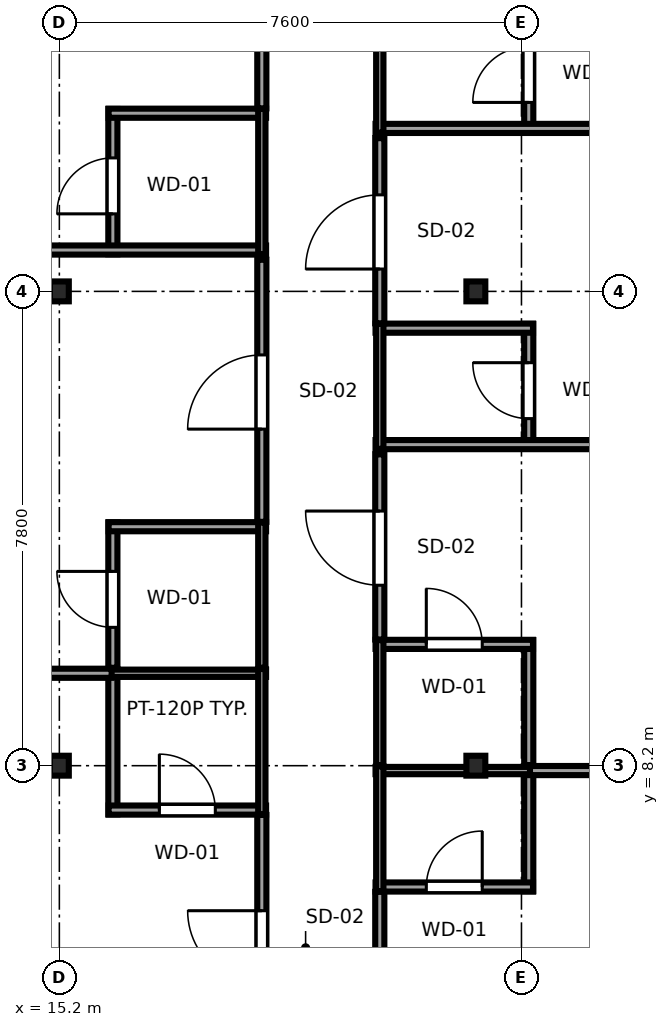
"""IFC4 building model, lengths in metres.
Left out: names, types, materials, properties, quantities, classifications, styles, units other than length and angle.
Written with IfcOpenShell. Run it as: python <this file> out.ifc"""

import sys

from ifc_helpers import new_model, si_unit, direction, frame, frame_2d, origin, origin_2d, place, context, subcontext, project, spatial, rectangle, i_section, extrude, source, transform, mapped, element, fill, save


model = new_model("IFC4")
c1 = context("Model", 3, precision=1e-05, world=origin(), true_north=direction((0.0, 1.0)))
c2 = subcontext(c1, "Body", "Model", "MODEL_VIEW")
j1 = project(units=[si_unit("LENGTHUNIT", "METRE"), si_unit("PLANEANGLEUNIT", "RADIAN")], contexts=[c1])
p1 = place(None, origin())
s1 = spatial("IfcSite", under=j1, at=p1, CompositionType="ELEMENT")
p2 = place(p1, origin())
s2 = spatial("IfcBuilding", under=s1, at=p2, CompositionType="ELEMENT")
p3 = place(p2, frame((0.0, 0.0, 231.0)))
s3 = spatial("IfcBuildingStorey", under=s2, at=p3, CompositionType="ELEMENT", Elevation=231.0)
m1 = source(origin(), c2, "Body", "SweptSolid", [
    extrude(i_section(OverallWidth=0.311, OverallDepth=0.327, WebThickness=0.016, FlangeThickness=0.025, FilletRadius=0.017, at=origin_2d()), origin(), (0.0, 0.0, 1.0), 3.55),
])
for number, where, z_axis, x_axis in (
    (1, (15.2, 8.2, 0.0), (0.0, 0.0, 1.0), (1.0, 0.0, 0.0)),
    (2, (15.2, 16.0, 0.0), (0.0, 0.0, 1.0), (1.0, 0.0, 0.0)),
    (3, (22.05, 8.2, 0.0), (0.0, 0.0, 1.0), (1.0, 0.0, 0.0)),
    (4, (22.05, 16.0, 0.0), (0.0, 0.0, 1.0), (1.0, 0.0, 0.0)),
):
    element("IfcColumn", number, at=place(p3, frame(where, z_axis=z_axis, x_axis=x_axis)), inside=s3, PredefinedType="COLUMN", context=c2, shape_type="MappedRepresentation", body=[
        mapped(m1, transform((0.0, 0.0, 0.0), x_axis=(1.0, 0.0, 0.0), y_axis=(0.0, 1.0, 0.0), z_axis=(0.0, 0.0, 1.0), scale=1.0)),
    ])
p4 = place(p3, frame((16.08, 7.4, 0.0), z_axis=(0.0, 0.0, 1.0), x_axis=(0.0, 1.0, 0.0)))
e5 = element("IfcWall", 5, at=p4, inside=s3, PredefinedType="PARTITIONING", context=c2, shape_type="SweptSolid", body=[
    extrude(rectangle(XDim=2.39, YDim=0.15, at=frame_2d((1.195, 0.0))), origin(), (0.0, 0.0, 1.0), 3.37),
])
p5 = place(p3, frame((16.01, 7.47, 0.0), z_axis=(0.0, 0.0, 1.0), x_axis=(1.0, 0.0, 0.0)))
e6 = element("IfcWall", 6, at=p5, inside=s3, PredefinedType="PARTITIONING", context=c2, shape_type="SweptSolid", body=[
    extrude(rectangle(XDim=2.59, YDim=0.15, at=frame_2d((1.295, 0.0))), origin(), (0.0, 0.0, 1.0), 3.37),
])
p6 = place(p5, frame((0.835, 0.0, 0.0)))
e7 = element("IfcOpeningElement", 7, at=p6, cuts=e6, PredefinedType="OPENING", context=c2, shape_type="SweptSolid", body=[
    extrude(rectangle(XDim=0.92, YDim=2.01, at=frame_2d((0.46, 1.005))), frame((0.0, 0.085, 0.0), z_axis=(0.0, -1.0, 0.0), x_axis=(1.0, 0.0, 0.0)), (0.0, 0.0, 1.0), 0.17),
])
p7 = place(p3, frame((16.01, 9.72, 0.0), z_axis=(0.0, 0.0, 1.0), x_axis=(1.0, 0.0, 0.0)))
e8 = element("IfcWall", 8, at=p7, inside=s3, PredefinedType="PLUMBINGWALL", context=c2, shape_type="SweptSolid", body=[
    extrude(rectangle(XDim=2.59, YDim=0.12, at=frame_2d((1.295, 0.0))), origin(), (0.0, 0.0, 1.0), 3.37),
])
p8 = place(p3, frame((18.53, 7.4, 0.0), z_axis=(0.0, 0.0, 1.0), x_axis=(0.0, 1.0, 0.0)))
e9 = element("IfcWall", 9, at=p8, inside=s3, PredefinedType="PLUMBINGWALL", context=c2, shape_type="SweptSolid", body=[
    extrude(rectangle(XDim=2.39, YDim=0.12, at=frame_2d((1.195, 0.0))), origin(), (0.0, 0.0, 1.0), 3.37),
])
p9 = place(p3, frame((16.08, 9.81, 0.0), z_axis=(0.0, 0.0, 1.0), x_axis=(0.0, 1.0, 0.0)))
e10 = element("IfcWall", 10, at=p9, inside=s3, PredefinedType="PARTITIONING", context=c2, shape_type="SweptSolid", body=[
    extrude(rectangle(XDim=2.39, YDim=0.15, at=frame_2d((1.195, 0.0))), origin(), (0.0, 0.0, 1.0), 3.37),
])
p10 = place(p9, frame((0.665, 0.0, 0.0)))
e11 = element("IfcOpeningElement", 11, at=p10, cuts=e10, PredefinedType="OPENING", context=c2, shape_type="SweptSolid", body=[
    extrude(rectangle(XDim=0.92, YDim=2.01, at=frame_2d((0.46, 1.005))), frame((0.0, 0.085, 0.0), z_axis=(0.0, -1.0, 0.0), x_axis=(1.0, 0.0, 0.0)), (0.0, 0.0, 1.0), 0.17),
])
p11 = place(p3, frame((16.01, 12.13, 0.0), z_axis=(0.0, 0.0, 1.0), x_axis=(1.0, 0.0, 0.0)))
e12 = element("IfcWall", 12, at=p11, inside=s3, PredefinedType="PARTITIONING", context=c2, shape_type="SweptSolid", body=[
    extrude(rectangle(XDim=2.59, YDim=0.15, at=frame_2d((1.295, 0.0))), origin(), (0.0, 0.0, 1.0), 3.37),
])
p12 = place(p3, frame((18.53, 9.81, 0.0), z_axis=(0.0, 0.0, 1.0), x_axis=(0.0, 1.0, 0.0)))
e13 = element("IfcWall", 13, at=p12, inside=s3, PredefinedType="PLUMBINGWALL", context=c2, shape_type="SweptSolid", body=[
    extrude(rectangle(XDim=2.39, YDim=0.12, at=frame_2d((1.195, 0.0))), origin(), (0.0, 0.0, 1.0), 3.37),
])
p13 = place(p3, frame((16.08, 16.61, 0.0), z_axis=(0.0, 0.0, 1.0), x_axis=(0.0, 1.0, 0.0)))
e14 = element("IfcWall", 14, at=p13, inside=s3, PredefinedType="PARTITIONING", context=c2, shape_type="SweptSolid", body=[
    extrude(rectangle(XDim=2.39, YDim=0.15, at=frame_2d((1.195, 0.0))), origin(), (0.0, 0.0, 1.0), 3.37),
])
p14 = place(p13, frame((0.665, 0.0, 0.0)))
e15 = element("IfcOpeningElement", 15, at=p14, cuts=e14, PredefinedType="OPENING", context=c2, shape_type="SweptSolid", body=[
    extrude(rectangle(XDim=0.92, YDim=2.01, at=frame_2d((0.46, 1.005))), frame((0.0, 0.085, 0.0), z_axis=(0.0, -1.0, 0.0), x_axis=(1.0, 0.0, 0.0)), (0.0, 0.0, 1.0), 0.17),
])
p15 = place(p3, frame((3.005, 16.68, 0.0), z_axis=(0.0, 0.0, 1.0), x_axis=(1.0, 0.0, 0.0)))
e16 = element("IfcWall", 16, at=p15, inside=s3, PredefinedType="PARTITIONING", context=c2, shape_type="SweptSolid", body=[
    extrude(rectangle(XDim=15.595, YDim=0.15, at=frame_2d((7.798, 0.0))), origin(), (0.0, 0.0, 1.0), 3.37),
])
p16 = place(p3, frame((16.01, 18.93, 0.0), z_axis=(0.0, 0.0, 1.0), x_axis=(1.0, 0.0, 0.0)))
e17 = element("IfcWall", 17, at=p16, inside=s3, PredefinedType="PARTITIONING", context=c2, shape_type="SweptSolid", body=[
    extrude(rectangle(XDim=2.59, YDim=0.15, at=frame_2d((1.295, 0.0))), origin(), (0.0, 0.0, 1.0), 3.37),
])
p17 = place(p3, frame((18.53, 16.61, 0.0), z_axis=(0.0, 0.0, 1.0), x_axis=(0.0, 1.0, 0.0)))
e18 = element("IfcWall", 18, at=p17, inside=s3, PredefinedType="PLUMBINGWALL", context=c2, shape_type="SweptSolid", body=[
    extrude(rectangle(XDim=2.39, YDim=0.12, at=frame_2d((1.195, 0.0))), origin(), (0.0, 0.0, 1.0), 3.37),
])
p18 = place(p3, frame((22.92, 6.135, 0.0), z_axis=(0.0, 0.0, 1.0), x_axis=(0.0, 1.0, 0.0)))
e19 = element("IfcWall", 19, at=p18, inside=s3, PredefinedType="PARTITIONING", context=c2, shape_type="SweptSolid", body=[
    extrude(rectangle(XDim=2.055, YDim=0.15, at=frame_2d((1.027, 0.0))), origin(), (0.0, 0.0, 1.0), 3.37),
])
p19 = place(p3, frame((20.4, 6.205, 0.0), z_axis=(0.0, 0.0, 1.0), x_axis=(1.0, 0.0, 0.0)))
e20 = element("IfcWall", 20, at=p19, inside=s3, PredefinedType="PARTITIONING", context=c2, shape_type="SweptSolid", body=[
    extrude(rectangle(XDim=2.59, YDim=0.15, at=frame_2d((1.295, 0.0))), origin(), (0.0, 0.0, 1.0), 3.37),
])
p20 = place(p19, frame((0.835, 0.0, 0.0)))
e21 = element("IfcOpeningElement", 21, at=p20, cuts=e20, PredefinedType="OPENING", context=c2, shape_type="SweptSolid", body=[
    extrude(rectangle(XDim=0.92, YDim=2.01, at=frame_2d((0.46, 1.005))), frame((0.0, 0.085, 0.0), z_axis=(0.0, -1.0, 0.0), x_axis=(1.0, 0.0, 0.0)), (0.0, 0.0, 1.0), 0.17),
])
p21 = place(p3, frame((20.4, 8.12, 0.0), z_axis=(0.0, 0.0, 1.0), x_axis=(1.0, 0.0, 0.0)))
e22 = element("IfcWall", 22, at=p21, inside=s3, PredefinedType="PLUMBINGWALL", context=c2, shape_type="SweptSolid", body=[
    extrude(rectangle(XDim=2.59, YDim=0.12, at=frame_2d((1.295, 0.0))), origin(), (0.0, 0.0, 1.0), 2.758),
])
p22 = place(p3, frame((20.47, 6.135, 0.0), z_axis=(0.0, 0.0, 1.0), x_axis=(0.0, 1.0, 0.0)))
e23 = element("IfcWall", 23, at=p22, inside=s3, PredefinedType="PLUMBINGWALL", context=c2, shape_type="SweptSolid", body=[
    extrude(rectangle(XDim=2.055, YDim=0.12, at=frame_2d((1.027, 0.0))), origin(), (0.0, 0.0, 1.0), 3.37),
])
p23 = place(p3, frame((22.92, 8.21, 0.0), z_axis=(0.0, 0.0, 1.0), x_axis=(0.0, 1.0, 0.0)))
e24 = element("IfcWall", 24, at=p23, inside=s3, PredefinedType="PARTITIONING", context=c2, shape_type="SweptSolid", body=[
    extrude(rectangle(XDim=2.055, YDim=0.15, at=frame_2d((1.027, 0.0))), origin(), (0.0, 0.0, 1.0), 3.37),
])
p24 = place(p3, frame((20.4, 10.195, 0.0), z_axis=(0.0, 0.0, 1.0), x_axis=(1.0, 0.0, 0.0)))
e25 = element("IfcWall", 25, at=p24, inside=s3, PredefinedType="PARTITIONING", context=c2, shape_type="SweptSolid", body=[
    extrude(rectangle(XDim=2.59, YDim=0.15, at=frame_2d((1.295, 0.0))), origin(), (0.0, 0.0, 1.0), 3.37),
])
p25 = place(p24, frame((0.835, 0.0, 0.0)))
e26 = element("IfcOpeningElement", 26, at=p25, cuts=e25, PredefinedType="OPENING", context=c2, shape_type="SweptSolid", body=[
    extrude(rectangle(XDim=0.92, YDim=2.01, at=frame_2d((0.46, 1.005))), frame((0.0, 0.085, 0.0), z_axis=(0.0, -1.0, 0.0), x_axis=(1.0, 0.0, 0.0)), (0.0, 0.0, 1.0), 0.17),
])
p26 = place(p3, frame((20.47, 8.21, 0.0), z_axis=(0.0, 0.0, 1.0), x_axis=(0.0, 1.0, 0.0)))
e27 = element("IfcWall", 27, at=p26, inside=s3, PredefinedType="PLUMBINGWALL", context=c2, shape_type="SweptSolid", body=[
    extrude(rectangle(XDim=2.055, YDim=0.12, at=frame_2d((1.027, 0.0))), origin(), (0.0, 0.0, 1.0), 3.37),
])
p27 = place(p3, frame((22.92, 13.41, 0.0), z_axis=(0.0, 0.0, 1.0), x_axis=(0.0, 1.0, 0.0)))
e28 = element("IfcWall", 28, at=p27, inside=s3, PredefinedType="PARTITIONING", context=c2, shape_type="SweptSolid", body=[
    extrude(rectangle(XDim=2.055, YDim=0.15, at=frame_2d((1.028, 0.0))), origin(), (0.0, 0.0, 1.0), 3.37),
])
p28 = place(p27, frame((0.498, 0.0, 0.0)))
e29 = element("IfcOpeningElement", 29, at=p28, cuts=e28, PredefinedType="OPENING", context=c2, shape_type="SweptSolid", body=[
    extrude(rectangle(XDim=0.92, YDim=2.01, at=frame_2d((0.46, 1.005))), frame((0.0, 0.085, 0.0), z_axis=(0.0, -1.0, 0.0), x_axis=(1.0, 0.0, 0.0)), (0.0, 0.0, 1.0), 0.17),
])
p29 = place(p3, frame((20.4, 13.48, 0.0), z_axis=(0.0, 0.0, 1.0), x_axis=(1.0, 0.0, 0.0)))
e30 = element("IfcWall", 30, at=p29, inside=s3, PredefinedType="PARTITIONING", context=c2, shape_type="SweptSolid", body=[
    extrude(rectangle(XDim=18.995, YDim=0.15, at=frame_2d((9.498, 0.0))), origin(), (0.0, 0.0, 1.0), 3.37),
])
p30 = place(p3, frame((20.4, 15.395, 0.0), z_axis=(0.0, 0.0, 1.0), x_axis=(1.0, 0.0, 0.0)))
e31 = element("IfcWall", 31, at=p30, inside=s3, PredefinedType="PARTITIONING", context=c2, shape_type="SweptSolid", body=[
    extrude(rectangle(XDim=2.59, YDim=0.15, at=frame_2d((1.295, 0.0))), origin(), (0.0, 0.0, 1.0), 3.37),
])
p31 = place(p3, frame((20.47, 13.41, 0.0), z_axis=(0.0, 0.0, 1.0), x_axis=(0.0, 1.0, 0.0)))
e32 = element("IfcWall", 32, at=p31, inside=s3, PredefinedType="PLUMBINGWALL", context=c2, shape_type="SweptSolid", body=[
    extrude(rectangle(XDim=2.055, YDim=0.12, at=frame_2d((1.028, 0.0))), origin(), (0.0, 0.0, 1.0), 3.37),
])
p32 = place(p3, frame((22.92, 18.61, 0.0), z_axis=(0.0, 0.0, 1.0), x_axis=(0.0, 1.0, 0.0)))
e33 = element("IfcWall", 33, at=p32, inside=s3, PredefinedType="PARTITIONING", context=c2, shape_type="SweptSolid", body=[
    extrude(rectangle(XDim=2.055, YDim=0.15, at=frame_2d((1.027, 0.0))), origin(), (0.0, 0.0, 1.0), 3.37),
])
p33 = place(p32, frame((0.498, 0.0, 0.0)))
e34 = element("IfcOpeningElement", 34, at=p33, cuts=e33, PredefinedType="OPENING", context=c2, shape_type="SweptSolid", body=[
    extrude(rectangle(XDim=0.92, YDim=2.01, at=frame_2d((0.46, 1.005))), frame((0.0, 0.085, 0.0), z_axis=(0.0, -1.0, 0.0), x_axis=(1.0, 0.0, 0.0)), (0.0, 0.0, 1.0), 0.17),
])
p34 = place(p3, frame((20.4, 18.68, 0.0), z_axis=(0.0, 0.0, 1.0), x_axis=(1.0, 0.0, 0.0)))
e35 = element("IfcWall", 35, at=p34, inside=s3, PredefinedType="PARTITIONING", context=c2, shape_type="SweptSolid", body=[
    extrude(rectangle(XDim=18.995, YDim=0.15, at=frame_2d((9.498, 0.0))), origin(), (0.0, 0.0, 1.0), 3.37),
])
p35 = place(p3, frame((20.47, 18.61, 0.0), z_axis=(0.0, 0.0, 1.0), x_axis=(0.0, 1.0, 0.0)))
e36 = element("IfcWall", 36, at=p35, inside=s3, PredefinedType="PLUMBINGWALL", context=c2, shape_type="SweptSolid", body=[
    extrude(rectangle(XDim=2.055, YDim=0.12, at=frame_2d((1.027, 0.0))), origin(), (0.0, 0.0, 1.0), 3.37),
])
p36 = place(p3, frame((18.53, 3.005, 0.0), z_axis=(0.0, 0.0, 1.0), x_axis=(0.0, 1.0, 0.0)))
e37 = element("IfcWall", 37, at=p36, inside=s3, PredefinedType="PARTITIONING", context=c2, shape_type="SweptSolid", body=[
    extrude(rectangle(XDim=4.385, YDim=0.15, at=frame_2d((2.192, 0.0))), origin(), (0.0, 0.0, 1.0), 3.37),
])
p37 = place(p36, frame((1.59, 0.0, 0.0)))
e38 = element("IfcOpeningElement", 38, at=p37, cuts=e37, PredefinedType="OPENING", context=c2, shape_type="SweptSolid", body=[
    extrude(rectangle(XDim=1.22, YDim=2.08, at=frame_2d((0.61, 1.04))), frame((0.0, 0.085, 0.0), z_axis=(0.0, -1.0, 0.0), x_axis=(1.0, 0.0, 0.0)), (0.0, 0.0, 1.0), 0.17),
])
p38 = place(p3, frame((3.005, 9.72, 0.0), z_axis=(0.0, 0.0, 1.0), x_axis=(1.0, 0.0, 0.0)))
e39 = element("IfcWall", 39, at=p38, inside=s3, PredefinedType="PARTITIONING", context=c2, shape_type="SweptSolid", body=[
    extrude(rectangle(XDim=13.055, YDim=0.15, at=frame_2d((6.528, 0.0))), origin(), (0.0, 0.0, 1.0), 3.37),
])
p39 = place(p3, frame((18.53, 12.21, 0.0), z_axis=(0.0, 0.0, 1.0), x_axis=(0.0, 1.0, 0.0)))
e40 = element("IfcWall", 40, at=p39, inside=s3, PredefinedType="PARTITIONING", context=c2, shape_type="SweptSolid", body=[
    extrude(rectangle(XDim=4.31, YDim=0.15, at=frame_2d((2.155, 0.0))), origin(), (0.0, 0.0, 1.0), 3.37),
])
p40 = place(p39, frame((1.525, 0.0, 0.0)))
e41 = element("IfcOpeningElement", 41, at=p40, cuts=e40, PredefinedType="OPENING", context=c2, shape_type="SweptSolid", body=[
    extrude(rectangle(XDim=1.22, YDim=2.08, at=frame_2d((0.61, 1.04))), frame((0.0, 0.085, 0.0), z_axis=(0.0, -1.0, 0.0), x_axis=(1.0, 0.0, 0.0)), (0.0, 0.0, 1.0), 0.17),
])
p41 = place(p3, frame((18.53, 19.01, 0.0), z_axis=(0.0, 0.0, 1.0), x_axis=(0.0, 1.0, 0.0)))
e42 = element("IfcWall", 42, at=p41, inside=s3, PredefinedType="PARTITIONING", context=c2, shape_type="SweptSolid", body=[
    extrude(rectangle(XDim=4.31, YDim=0.15, at=frame_2d((2.155, 0.0))), origin(), (0.0, 0.0, 1.0), 3.37),
])
p42 = place(p41, frame((1.525, 0.0, 0.0)))
e43 = element("IfcOpeningElement", 43, at=p42, cuts=e42, PredefinedType="OPENING", context=c2, shape_type="SweptSolid", body=[
    extrude(rectangle(XDim=1.22, YDim=2.08, at=frame_2d((0.61, 1.04))), frame((0.0, 0.085, 0.0), z_axis=(0.0, -1.0, 0.0), x_axis=(1.0, 0.0, 0.0)), (0.0, 0.0, 1.0), 0.17),
])
p43 = place(p3, frame((20.47, 3.005, 0.0), z_axis=(0.0, 0.0, 1.0), x_axis=(0.0, 1.0, 0.0)))
e44 = element("IfcWall", 44, at=p43, inside=s3, PredefinedType="PARTITIONING", context=c2, shape_type="SweptSolid", body=[
    extrude(rectangle(XDim=3.12, YDim=0.15, at=frame_2d((1.56, 0.0))), origin(), (0.0, 0.0, 1.0), 3.37),
])
p44 = place(p43, frame((0.958, 0.0, 0.0)))
e45 = element("IfcOpeningElement", 45, at=p44, cuts=e44, PredefinedType="OPENING", context=c2, shape_type="SweptSolid", body=[
    extrude(rectangle(XDim=1.22, YDim=2.08, at=frame_2d((0.61, 1.04))), frame((0.0, 0.085, 0.0), z_axis=(0.0, -1.0, 0.0), x_axis=(1.0, 0.0, 0.0)), (0.0, 0.0, 1.0), 0.17),
])
p45 = place(p3, frame((22.94, 8.12, 0.0), z_axis=(0.0, 0.0, 1.0), x_axis=(1.0, 0.0, 0.0)))
e46 = element("IfcWall", 46, at=p45, inside=s3, PredefinedType="PARTITIONING", context=c2, shape_type="SweptSolid", body=[
    extrude(rectangle(XDim=16.455, YDim=0.15, at=frame_2d((8.228, 0.0))), origin(), (0.0, 0.0, 1.0), 2.758),
])
p46 = place(p3, frame((20.47, 10.275, 0.0), z_axis=(0.0, 0.0, 1.0), x_axis=(0.0, 1.0, 0.0)))
e47 = element("IfcWall", 47, at=p46, inside=s3, PredefinedType="PARTITIONING", context=c2, shape_type="SweptSolid", body=[
    extrude(rectangle(XDim=3.045, YDim=0.15, at=frame_2d((1.522, 0.0))), origin(), (0.0, 0.0, 1.0), 3.37),
])
p47 = place(p46, frame((0.893, 0.0, 0.0)))
e48 = element("IfcOpeningElement", 48, at=p47, cuts=e47, PredefinedType="OPENING", context=c2, shape_type="SweptSolid", body=[
    extrude(rectangle(XDim=1.22, YDim=2.08, at=frame_2d((0.61, 1.04))), frame((0.0, 0.085, 0.0), z_axis=(0.0, -1.0, 0.0), x_axis=(1.0, 0.0, 0.0)), (0.0, 0.0, 1.0), 0.17),
])
p48 = place(p3, frame((20.47, 15.475, 0.0), z_axis=(0.0, 0.0, 1.0), x_axis=(0.0, 1.0, 0.0)))
e49 = element("IfcWall", 49, at=p48, inside=s3, PredefinedType="PARTITIONING", context=c2, shape_type="SweptSolid", body=[
    extrude(rectangle(XDim=3.045, YDim=0.15, at=frame_2d((1.522, 0.0))), origin(), (0.0, 0.0, 1.0), 3.37),
])
p49 = place(p48, frame((0.893, 0.0, 0.0)))
e50 = element("IfcOpeningElement", 50, at=p49, cuts=e49, PredefinedType="OPENING", context=c2, shape_type="SweptSolid", body=[
    extrude(rectangle(XDim=1.22, YDim=2.08, at=frame_2d((0.61, 1.04))), frame((0.0, 0.085, 0.0), z_axis=(0.0, -1.0, 0.0), x_axis=(1.0, 0.0, 0.0)), (0.0, 0.0, 1.0), 0.17),
])
m2 = source(origin(), c2, "Body", "SweptSolid", [
    extrude(rectangle(XDim=0.92, YDim=2.01, at=frame_2d((0.46, 1.005))), frame((0.0, 0.025, 0.0), z_axis=(0.0, -1.0, 0.0), x_axis=(1.0, 0.0, 0.0)), (0.0, 0.0, 1.0), 0.05),
])
p50 = place(p6, origin())
e51 = element("IfcDoor", 51, at=p50, inside=s3, OperationType="SINGLE_SWING_LEFT", PredefinedType="DOOR", context=c2, shape_type="MappedRepresentation", body=[
    mapped(m2, transform((0.0, 0.0, 0.0), x_axis=(1.0, 0.0, 0.0), y_axis=(0.0, 1.0, 0.0), z_axis=(0.0, 0.0, 1.0), scale=1.0)),
])
fill(e7, e51)
p51 = place(p10, origin())
e52 = element("IfcDoor", 52, at=p51, inside=s3, OperationType="SINGLE_SWING_RIGHT", PredefinedType="DOOR", context=c2, shape_type="MappedRepresentation", body=[
    mapped(m2, transform((0.0, 0.0, 0.0), x_axis=(1.0, 0.0, 0.0), y_axis=(0.0, 1.0, 0.0), z_axis=(0.0, 0.0, 1.0), scale=1.0)),
])
fill(e11, e52)
p52 = place(p14, origin())
e53 = element("IfcDoor", 53, at=p52, inside=s3, OperationType="SINGLE_SWING_LEFT", PredefinedType="DOOR", context=c2, shape_type="MappedRepresentation", body=[
    mapped(m2, transform((0.0, 0.0, 0.0), x_axis=(1.0, 0.0, 0.0), y_axis=(0.0, 1.0, 0.0), z_axis=(0.0, 0.0, 1.0), scale=1.0)),
])
fill(e15, e53)
p53 = place(p20, origin())
e54 = element("IfcDoor", 54, at=p53, inside=s3, OperationType="SINGLE_SWING_RIGHT", PredefinedType="DOOR", context=c2, shape_type="MappedRepresentation", body=[
    mapped(m2, transform((0.0, 0.0, 0.0), x_axis=(1.0, 0.0, 0.0), y_axis=(0.0, 1.0, 0.0), z_axis=(0.0, 0.0, 1.0), scale=1.0)),
])
fill(e21, e54)
p54 = place(p25, origin())
e55 = element("IfcDoor", 55, at=p54, inside=s3, OperationType="SINGLE_SWING_LEFT", PredefinedType="DOOR", context=c2, shape_type="MappedRepresentation", body=[
    mapped(m2, transform((0.0, 0.0, 0.0), x_axis=(1.0, 0.0, 0.0), y_axis=(0.0, 1.0, 0.0), z_axis=(0.0, 0.0, 1.0), scale=1.0)),
])
fill(e26, e55)
p55 = place(p28, origin())
e56 = element("IfcDoor", 56, at=p55, inside=s3, OperationType="SINGLE_SWING_RIGHT", PredefinedType="DOOR", context=c2, shape_type="MappedRepresentation", body=[
    mapped(m2, transform((0.0, 0.0, 0.0), x_axis=(1.0, 0.0, 0.0), y_axis=(0.0, 1.0, 0.0), z_axis=(0.0, 0.0, 1.0), scale=1.0)),
])
fill(e29, e56)
p56 = place(p33, origin())
e57 = element("IfcDoor", 57, at=p56, inside=s3, OperationType="SINGLE_SWING_LEFT", PredefinedType="DOOR", context=c2, shape_type="MappedRepresentation", body=[
    mapped(m2, transform((0.0, 0.0, 0.0), x_axis=(1.0, 0.0, 0.0), y_axis=(0.0, 1.0, 0.0), z_axis=(0.0, 0.0, 1.0), scale=1.0)),
])
fill(e34, e57)
m3 = source(origin(), c2, "Body", "SweptSolid", [
    extrude(rectangle(XDim=1.22, YDim=2.08, at=frame_2d((0.61, 1.04))), frame((0.0, 0.025, 0.0), z_axis=(0.0, -1.0, 0.0), x_axis=(1.0, 0.0, 0.0)), (0.0, 0.0, 1.0), 0.05),
])
p57 = place(p37, origin())
e58 = element("IfcDoor", 58, at=p57, inside=s3, OperationType="SINGLE_SWING_RIGHT", PredefinedType="DOOR", context=c2, shape_type="MappedRepresentation", body=[
    mapped(m3, transform((0.0, 0.0, 0.0), x_axis=(1.0, 0.0, 0.0), y_axis=(0.0, 1.0, 0.0), z_axis=(0.0, 0.0, 1.0), scale=1.0)),
])
fill(e38, e58)
p58 = place(p40, origin())
e59 = element("IfcDoor", 59, at=p58, inside=s3, OperationType="SINGLE_SWING_LEFT", PredefinedType="DOOR", context=c2, shape_type="MappedRepresentation", body=[
    mapped(m3, transform((0.0, 0.0, 0.0), x_axis=(1.0, 0.0, 0.0), y_axis=(0.0, 1.0, 0.0), z_axis=(0.0, 0.0, 1.0), scale=1.0)),
])
fill(e41, e59)
p59 = place(p47, origin())
e60 = element("IfcDoor", 60, at=p59, inside=s3, OperationType="SINGLE_SWING_RIGHT", PredefinedType="DOOR", context=c2, shape_type="MappedRepresentation", body=[
    mapped(m3, transform((0.0, 0.0, 0.0), x_axis=(1.0, 0.0, 0.0), y_axis=(0.0, 1.0, 0.0), z_axis=(0.0, 0.0, 1.0), scale=1.0)),
])
fill(e48, e60)
p60 = place(p49, origin())
e61 = element("IfcDoor", 61, at=p60, inside=s3, OperationType="SINGLE_SWING_LEFT", PredefinedType="DOOR", context=c2, shape_type="MappedRepresentation", body=[
    mapped(m3, transform((0.0, 0.0, 0.0), x_axis=(1.0, 0.0, 0.0), y_axis=(0.0, 1.0, 0.0), z_axis=(0.0, 0.0, 1.0), scale=1.0)),
])
fill(e50, e61)
save(model, sys.argv[1])
